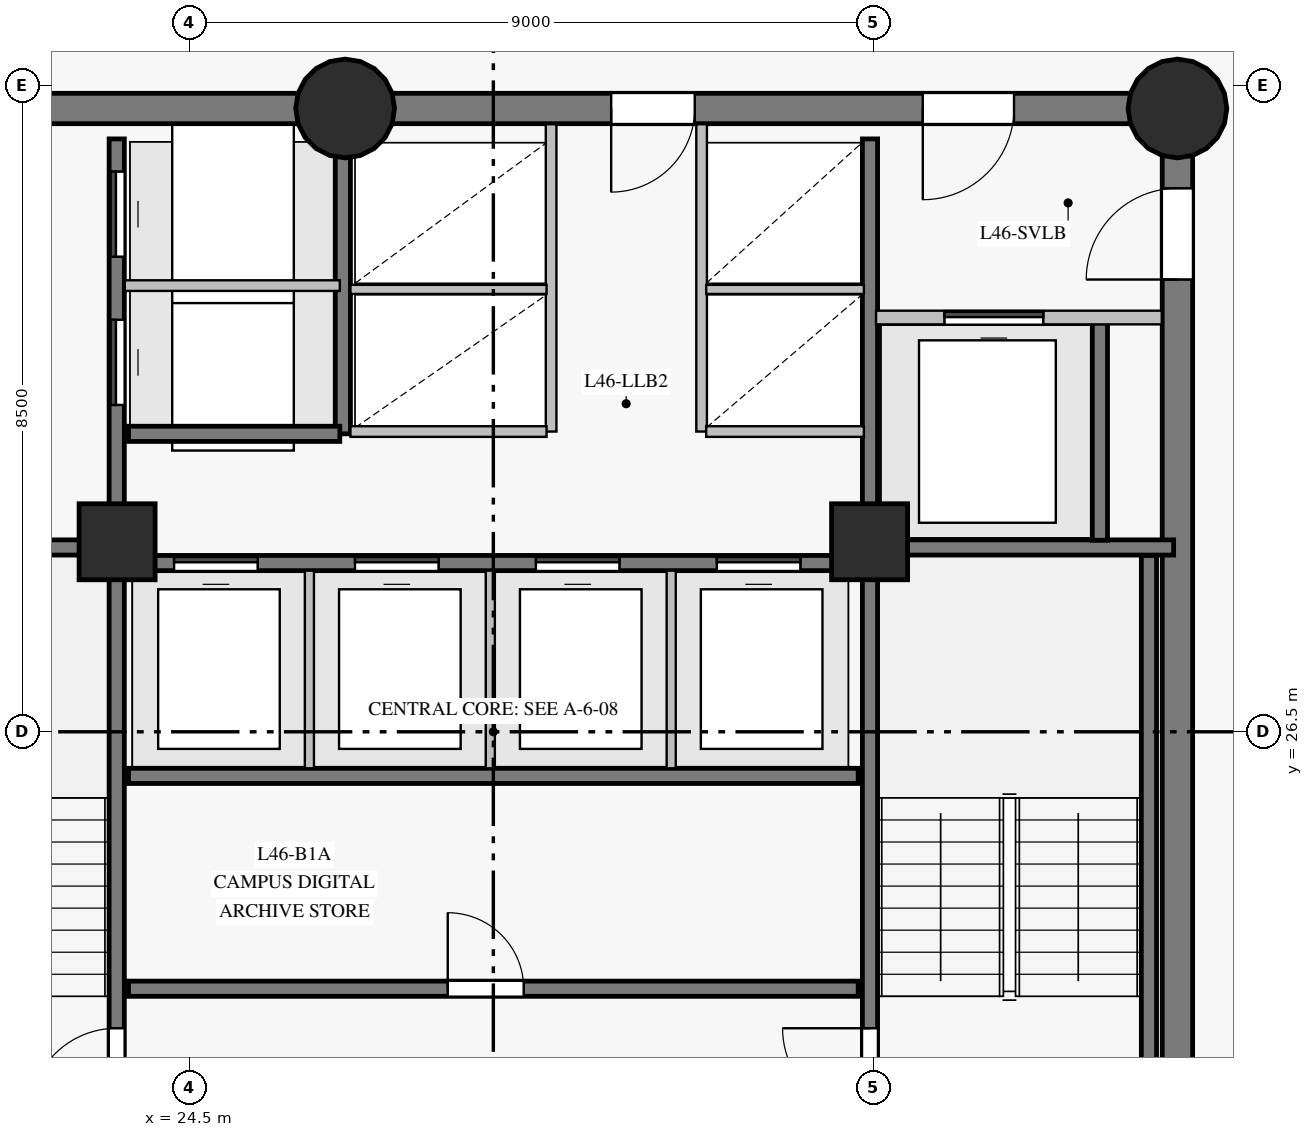
"""IFC4 building model, lengths in metres.
Left out: names, types, materials, properties, quantities, classifications, styles, units other than length and angle.
Written with IfcOpenShell. Run it as: python <this file> out.ifc"""

import sys

from ifc_helpers import new_model, si_unit, direction, frame, frame_2d, origin, origin_with_axes, origin_2d, place, context, subcontext, project, spatial, rectangle, circle, extrude, source, transform, mapped, element, fill, save


model = new_model("IFC4")
c1 = context("Model", 3, precision=1e-05, world=origin(), true_north=direction((0.0, 1.0)))
c2 = subcontext(c1, "Body", "Model", "MODEL_VIEW")
j1 = project(units=[si_unit("LENGTHUNIT", "METRE"), si_unit("PLANEANGLEUNIT", "RADIAN")], contexts=[c1])
p1 = place(None, origin())
s1 = spatial("IfcSite", under=j1, at=p1, CompositionType="ELEMENT")
p2 = place(p1, origin())
s2 = spatial("IfcBuilding", under=s1, at=p2, CompositionType="ELEMENT")
p3 = place(p2, frame((0.0, 0.0, 162.65)))
s3 = spatial("IfcBuildingStorey", under=s2, at=p3, CompositionType="ELEMENT", Elevation=162.65)
p4 = place(p3, frame((37.5, 18.3, 0.0), z_axis=(0.0, 0.0, 1.0), x_axis=(0.0, 1.0, 0.0)))
e1 = element("IfcWall", 1, at=p4, inside=s3, PredefinedType="SHEAR", context=c2, shape_type="SweptSolid", body=[
    extrude(rectangle(XDim=16.4, YDim=0.4, at=frame_2d((8.2, 0.0))), origin(), (0.0, 0.0, 1.0), 2.825),
])
p5 = place(p4, frame((14.15, 0.0, 0.0)))
e2 = element("IfcOpeningElement", 2, at=p5, cuts=e1, PredefinedType="OPENING", context=c2, shape_type="SweptSolid", body=[
    extrude(rectangle(XDim=1.2, YDim=2.15, at=frame_2d((0.6, 1.075))), frame((0.0, 0.21, 0.0), z_axis=(0.0, -1.0, 0.0), x_axis=(1.0, 0.0, 0.0)), (0.0, 0.0, 1.0), 0.42),
])
p6 = place(p3, frame((37.5, 34.7, 0.0), z_axis=(0.0, 0.0, 1.0), x_axis=(-1.0, 0.0, 0.0)))
e3 = element("IfcWall", 3, at=p6, inside=s3, PredefinedType="SHEAR", context=c2, shape_type="SweptSolid", body=[
    extrude(rectangle(XDim=10.95, YDim=0.4, at=frame_2d((5.475, 0.0))), origin(), (0.0, 0.0, 1.0), 2.825),
])
p7 = place(p6, frame((2.15, 0.0, 0.0)))
e4 = element("IfcOpeningElement", 4, at=p7, cuts=e3, PredefinedType="OPENING", context=c2, shape_type="SweptSolid", body=[
    extrude(rectangle(XDim=1.2, YDim=2.15, at=frame_2d((0.6, 1.075))), frame((0.0, 0.21, 0.0), z_axis=(0.0, -1.0, 0.0), x_axis=(1.0, 0.0, 0.0)), (0.0, 0.0, 1.0), 0.42),
])
p8 = place(p6, frame((6.35, 0.0, 0.0)))
e5 = element("IfcOpeningElement", 5, at=p8, cuts=e3, PredefinedType="OPENING", context=c2, shape_type="SweptSolid", body=[
    extrude(rectangle(XDim=1.1, YDim=2.15, at=frame_2d((0.55, 1.075))), frame((0.0, 0.21, 0.0), z_axis=(0.0, -1.0, 0.0), x_axis=(1.0, 0.0, 0.0)), (0.0, 0.0, 1.0), 0.42),
])
p9 = place(p3, frame((26.55, 34.7, 0.0), z_axis=(0.0, 0.0, 1.0), x_axis=(-1.0, 0.0, 0.0)))
e6 = element("IfcWall", 6, at=p9, inside=s3, PredefinedType="SHEAR", context=c2, shape_type="SweptSolid", body=[
    extrude(rectangle(XDim=7.05, YDim=0.4, at=frame_2d((3.525, 0.0))), origin(), (0.0, 0.0, 1.0), 2.825),
])
p10 = place(p9, frame((4.25, 0.0, 0.0)))
e7 = element("IfcOpeningElement", 7, at=p10, cuts=e6, PredefinedType="OPENING", context=c2, shape_type="SweptSolid", body=[
    extrude(rectangle(XDim=1.1, YDim=2.15, at=frame_2d((0.55, 1.075))), frame((0.0, 0.21, 0.0), z_axis=(0.0, -1.0, 0.0), x_axis=(1.0, 0.0, 0.0)), (0.0, 0.0, 1.0), 0.42),
])
m1 = source(origin_with_axes(), c2, "Body", "SweptSolid", [
    extrude(circle(Radius=0.65, at=origin_2d()), origin(), (0.0, 0.0, 1.0), 3.05),
])
for number, where, z_axis, x_axis in (
    (8, (26.55, 34.7, 0.0), (0.0, 0.0, 1.0), (1.0, 0.0, 0.0)),
    (9, (37.5, 34.7, 0.0), (0.0, 0.0, 1.0), (1.0, 0.0, 0.0)),
):
    element("IfcColumn", number, at=place(p3, frame(where, z_axis=z_axis, x_axis=x_axis)), inside=s3, PredefinedType="COLUMN", context=c2, shape_type="MappedRepresentation", body=[
        mapped(m1, transform((0.0, 0.0, 0.0), scale=1.0)),
    ])
m2 = source(origin_with_axes(), c2, "Body", "SweptSolid", [
    extrude(rectangle(XDim=1.0, YDim=1.0, at=origin_2d()), origin(), (0.0, 0.0, 1.0), 3.05),
])
for number, where, z_axis, x_axis in (
    (10, (23.55, 29.0, 0.0), (0.0, 0.0, 1.0), (1.0, 0.0, 0.0)),
    (11, (33.45, 29.0, 0.0), (0.0, 0.0, 1.0), (1.0, 0.0, 0.0)),
):
    element("IfcColumn", number, at=place(p3, frame(where, z_axis=z_axis, x_axis=x_axis)), inside=s3, PredefinedType="COLUMN", context=c2, shape_type="MappedRepresentation", body=[
        mapped(m2, transform((0.0, 0.0, 0.0), scale=1.0)),
    ])
p11 = place(p3, frame((23.545, 18.7, 0.0), z_axis=(0.0, 0.0, 1.0), x_axis=(0.0, 1.0, 0.0)))
e12 = element("IfcWall", 12, at=p11, inside=s3, PredefinedType="SHEAR", context=c2, shape_type="SweptSolid", body=[
    extrude(rectangle(XDim=15.6, YDim=0.2, at=frame_2d((7.8, 0.0))), origin(), (0.0, 0.0, 1.0), 2.825),
])
p12 = place(p11, frame((2.75, 0.0, 0.0)))
e13 = element("IfcOpeningElement", 13, at=p12, cuts=e12, PredefinedType="OPENING", context=c2, shape_type="SweptSolid", body=[
    extrude(rectangle(XDim=1.15, YDim=2.15, at=frame_2d((0.575, 1.075))), frame((0.0, 0.11, 0.0), z_axis=(0.0, -1.0, 0.0), x_axis=(1.0, 0.0, 0.0)), (0.0, 0.0, 1.0), 0.22),
])
p13 = place(p11, frame((0.14, 0.0, 0.0)))
e14 = element("IfcOpeningElement", 14, at=p13, cuts=e12, PredefinedType="OPENING", context=c2, shape_type="SweptSolid", body=[
    extrude(rectangle(XDim=0.88, YDim=2.1, at=frame_2d((0.44, 1.05))), frame((0.0, 0.11, 0.0), z_axis=(0.0, -1.0, 0.0), x_axis=(1.0, 0.0, 0.0)), (0.0, 0.0, 1.0), 0.22),
])
p14 = place(p11, frame((1.36, 0.0, 0.0)))
e15 = element("IfcOpeningElement", 15, at=p14, cuts=e12, PredefinedType="OPENING", context=c2, shape_type="SweptSolid", body=[
    extrude(rectangle(XDim=0.88, YDim=2.1, at=frame_2d((0.44, 1.05))), frame((0.0, 0.11, 0.0), z_axis=(0.0, -1.0, 0.0), x_axis=(1.0, 0.0, 0.0)), (0.0, 0.0, 1.0), 0.22),
])
p15 = place(p11, frame((12.1, 0.0, 0.0)))
e16 = element("IfcOpeningElement", 16, at=p15, cuts=e12, PredefinedType="OPENING", context=c2, shape_type="SweptSolid", body=[
    extrude(rectangle(XDim=1.12, YDim=2.15, at=frame_2d((0.56, 1.075))), frame((0.0, 0.11, 0.0), z_axis=(0.0, -1.0, 0.0), x_axis=(1.0, 0.0, 0.0)), (0.0, 0.0, 1.0), 0.22),
])
p16 = place(p11, frame((14.05, 0.0, 0.0)))
e17 = element("IfcOpeningElement", 17, at=p16, cuts=e12, PredefinedType="OPENING", context=c2, shape_type="SweptSolid", body=[
    extrude(rectangle(XDim=1.12, YDim=2.15, at=frame_2d((0.56, 1.075))), frame((0.0, 0.11, 0.0), z_axis=(0.0, -1.0, 0.0), x_axis=(1.0, 0.0, 0.0)), (0.0, 0.0, 1.0), 0.22),
])
p17 = place(p3, frame((33.455, 18.7, 0.0), z_axis=(0.0, 0.0, 1.0), x_axis=(0.0, 1.0, 0.0)))
e18 = element("IfcWall", 18, at=p17, inside=s3, PredefinedType="SHEAR", context=c2, shape_type="SweptSolid", body=[
    extrude(rectangle(XDim=15.6, YDim=0.2, at=frame_2d((7.8, 0.0))), origin(), (0.0, 0.0, 1.0), 2.825),
])
p18 = place(p17, frame((2.75, 0.0, 0.0)))
e19 = element("IfcOpeningElement", 19, at=p18, cuts=e18, PredefinedType="OPENING", context=c2, shape_type="SweptSolid", body=[
    extrude(rectangle(XDim=1.15, YDim=2.15, at=frame_2d((0.575, 1.075))), frame((0.0, 0.11, 0.0), z_axis=(0.0, -1.0, 0.0), x_axis=(1.0, 0.0, 0.0)), (0.0, 0.0, 1.0), 0.22),
])
p19 = place(p17, frame((0.55, 0.0, 0.0)))
e20 = element("IfcOpeningElement", 20, at=p19, cuts=e18, PredefinedType="OPENING", context=c2, shape_type="SweptSolid", body=[
    extrude(rectangle(XDim=0.94, YDim=2.1, at=frame_2d((0.47, 1.05))), frame((0.0, 0.11, 0.0), z_axis=(0.0, -1.0, 0.0), x_axis=(1.0, 0.0, 0.0)), (0.0, 0.0, 1.0), 0.22),
])
p20 = place(p3, frame((23.7, 23.12, 0.0), z_axis=(0.0, 0.0, 1.0), x_axis=(1.0, 0.0, 0.0)))
e21 = element("IfcWall", 21, at=p20, inside=s3, PredefinedType="SHEAR", context=c2, shape_type="SweptSolid", body=[
    extrude(rectangle(XDim=9.6, YDim=0.2, at=frame_2d((4.8, 0.0))), origin(), (0.0, 0.0, 1.0), 2.825),
])
p21 = place(p20, frame((4.2, 0.0, 0.0)))
e22 = element("IfcOpeningElement", 22, at=p21, cuts=e21, PredefinedType="OPENING", context=c2, shape_type="SweptSolid", body=[
    extrude(rectangle(XDim=1.0, YDim=2.15, at=frame_2d((0.5, 1.075))), frame((0.0, 0.11, 0.0), z_axis=(0.0, -1.0, 0.0), x_axis=(1.0, 0.0, 0.0)), (0.0, 0.0, 1.0), 0.22),
])
p22 = place(p3, frame((23.7, 25.92, 0.0), z_axis=(0.0, 0.0, 1.0), x_axis=(1.0, 0.0, 0.0)))
e23 = element("IfcWall", 23, at=p22, inside=s3, PredefinedType="SHEAR", context=c2, shape_type="SweptSolid", body=[
    extrude(rectangle(XDim=9.6, YDim=0.2, at=frame_2d((4.8, 0.0))), origin(), (0.0, 0.0, 1.0), 2.825),
])
p23 = place(p3, frame((23.7, 28.72, 0.0), z_axis=(0.0, 0.0, 1.0), x_axis=(1.0, 0.0, 0.0)))
e24 = element("IfcWall", 24, at=p23, inside=s3, PredefinedType="SHEAR", context=c2, shape_type="SweptSolid", body=[
    extrude(rectangle(XDim=9.6, YDim=0.2, at=frame_2d((4.8, 0.0))), origin(), (0.0, 0.0, 1.0), 2.825),
])
p24 = place(p23, frame((0.6, 0.0, 0.0)))
e25 = element("IfcOpeningElement", 25, at=p24, cuts=e24, PredefinedType="OPENING", context=c2, shape_type="SweptSolid", body=[
    extrude(rectangle(XDim=1.1, YDim=2.15, at=frame_2d((0.55, 1.075))), frame((0.0, 0.11, 0.0), z_axis=(0.0, -1.0, 0.0), x_axis=(1.0, 0.0, 0.0)), (0.0, 0.0, 1.0), 0.22),
])
p25 = place(p23, frame((2.98, 0.0, 0.0)))
e26 = element("IfcOpeningElement", 26, at=p25, cuts=e24, PredefinedType="OPENING", context=c2, shape_type="SweptSolid", body=[
    extrude(rectangle(XDim=1.1, YDim=2.15, at=frame_2d((0.55, 1.075))), frame((0.0, 0.11, 0.0), z_axis=(0.0, -1.0, 0.0), x_axis=(1.0, 0.0, 0.0)), (0.0, 0.0, 1.0), 0.22),
])
p26 = place(p23, frame((5.36, 0.0, 0.0)))
e27 = element("IfcOpeningElement", 27, at=p26, cuts=e24, PredefinedType="OPENING", context=c2, shape_type="SweptSolid", body=[
    extrude(rectangle(XDim=1.1, YDim=2.15, at=frame_2d((0.55, 1.075))), frame((0.0, 0.11, 0.0), z_axis=(0.0, -1.0, 0.0), x_axis=(1.0, 0.0, 0.0)), (0.0, 0.0, 1.0), 0.22),
])
p27 = place(p23, frame((7.74, 0.0, 0.0)))
e28 = element("IfcOpeningElement", 28, at=p27, cuts=e24, PredefinedType="OPENING", context=c2, shape_type="SweptSolid", body=[
    extrude(rectangle(XDim=1.1, YDim=2.15, at=frame_2d((0.55, 1.075))), frame((0.0, 0.11, 0.0), z_axis=(0.0, -1.0, 0.0), x_axis=(1.0, 0.0, 0.0)), (0.0, 0.0, 1.0), 0.22),
])
p28 = place(p3, frame((37.125, 21.32, 0.0), z_axis=(0.0, 0.0, 1.0), x_axis=(0.0, 1.0, 0.0)))
e29 = element("IfcWall", 29, at=p28, inside=s3, PredefinedType="SHEAR", context=c2, shape_type="SweptSolid", body=[
    extrude(rectangle(XDim=7.5, YDim=0.2, at=frame_2d((3.75, 0.0))), origin(), (0.0, 0.0, 1.0), 2.825),
])
for number, where, z_axis, x_axis in (
    (30, (33.455, 28.925, 0.0), (0.0, 0.0, 1.0), (1.0, 0.0, 0.0)),
    (31, (19.55, 28.925, 0.0), (0.0, 0.0, 1.0), (1.0, 0.0, 0.0)),
):
    element("IfcWall", number, at=place(p3, frame(where, z_axis=z_axis, x_axis=x_axis)), inside=s3, PredefinedType="SHEAR", context=c2, shape_type="SweptSolid", body=[
        extrude(rectangle(XDim=3.995, YDim=0.2, at=frame_2d((1.998, 0.0))), origin(), (0.0, 0.0, 1.0), 2.825),
    ])
p29 = place(p3, frame((26.52, 30.42, 0.0), z_axis=(0.0, 0.0, 1.0), x_axis=(0.0, 1.0, 0.0)))
e32 = element("IfcWall", 32, at=p29, inside=s3, PredefinedType="SHEAR", context=c2, shape_type="SweptSolid", body=[
    extrude(rectangle(XDim=3.86, YDim=0.2, at=frame_2d((1.93, 0.0))), origin(), (0.0, 0.0, 1.0), 2.825),
])
p30 = place(p3, frame((36.48, 29.02, 0.0), z_axis=(0.0, 0.0, 1.0), x_axis=(0.0, 1.0, 0.0)))
e33 = element("IfcWall", 33, at=p30, inside=s3, PredefinedType="SHEAR", context=c2, shape_type="SweptSolid", body=[
    extrude(rectangle(XDim=2.86, YDim=0.2, at=frame_2d((1.43, 0.0))), origin(), (0.0, 0.0, 1.0), 2.825),
])
p31 = place(p3, frame((23.7, 30.42, 0.0), z_axis=(0.0, 0.0, 1.0), x_axis=(1.0, 0.0, 0.0)))
e34 = element("IfcWall", 34, at=p31, inside=s3, PredefinedType="SHEAR", context=c2, shape_type="SweptSolid", body=[
    extrude(rectangle(XDim=2.78, YDim=0.2, at=frame_2d((1.39, 0.0))), origin(), (0.0, 0.0, 1.0), 2.825),
])
for number, where, z_axis, x_axis in (
    (35, (29.26, 30.45, 0.0), (0.0, 0.0, 1.0), (0.0, 1.0, 0.0)),
    (36, (31.24, 30.45, 0.0), (0.0, 0.0, 1.0), (0.0, 1.0, 0.0)),
):
    element("IfcWall", number, at=place(p3, frame(where, z_axis=z_axis, x_axis=x_axis)), inside=s3, PredefinedType="PARTITIONING", context=c2, shape_type="SweptSolid", body=[
        extrude(rectangle(XDim=4.043, YDim=0.14, at=frame_2d((2.021, 0.0))), origin(), (0.0, 0.0, 1.0), 2.825),
    ])
p32 = place(p3, frame((33.535, 31.95, 0.0), z_axis=(0.0, 0.0, 1.0), x_axis=(1.0, 0.0, 0.0)))
e37 = element("IfcWall", 37, at=p32, inside=s3, PredefinedType="PARTITIONING", context=c2, shape_type="SweptSolid", body=[
    extrude(rectangle(XDim=3.759, YDim=0.18, at=frame_2d((1.879, 0.0))), origin(), (0.0, 0.0, 1.0), 2.825),
])
p33 = place(p32, frame((0.9, 0.0, 0.0)))
e38 = element("IfcOpeningElement", 38, at=p33, cuts=e37, PredefinedType="OPENING", context=c2, shape_type="SweptSolid", body=[
    extrude(rectangle(XDim=1.3, YDim=2.2, at=frame_2d((0.65, 1.1))), frame((0.0, 0.1, 0.0), z_axis=(0.0, -1.0, 0.0), x_axis=(1.0, 0.0, 0.0)), (0.0, 0.0, 1.0), 0.2),
])
p34 = place(p3, frame((23.652, 32.37, 0.0), z_axis=(0.0, 0.0, 1.0), x_axis=(1.0, 0.0, 0.0)))
e39 = element("IfcWall", 39, at=p34, inside=s3, PredefinedType="PARTITIONING", context=c2, shape_type="SweptSolid", body=[
    extrude(rectangle(XDim=2.828, YDim=0.14, at=frame_2d((1.414, 0.0))), origin(), (0.0, 0.0, 1.0), 2.825),
])
for number, where, z_axis, x_axis in (
    (40, (26.08, 26.02, 0.0), (0.0, 0.0, 1.0), (0.0, 1.0, 0.0)),
    (41, (28.46, 26.02, 0.0), (0.0, 0.0, 1.0), (0.0, 1.0, 0.0)),
    (42, (30.84, 26.02, 0.0), (0.0, 0.0, 1.0), (0.0, 1.0, 0.0)),
):
    element("IfcWall", number, at=place(p3, frame(where, z_axis=z_axis, x_axis=x_axis)), inside=s3, PredefinedType="PARTITIONING", context=c2, shape_type="SweptSolid", body=[
        extrude(rectangle(XDim=2.6, YDim=0.12, at=frame_2d((1.3, 0.0))), origin(), (0.0, 0.0, 1.0), 2.825),
    ])
p35 = place(p3, frame((26.62, 30.45, 0.0), z_axis=(0.0, 0.0, 1.0), x_axis=(1.0, 0.0, 0.0)))
e43 = element("IfcWall", 43, at=p35, inside=s3, PredefinedType="PARTITIONING", context=c2, shape_type="SweptSolid", body=[
    extrude(rectangle(XDim=2.58, YDim=0.14, at=frame_2d((1.29, 0.0))), origin(), (0.0, 0.0, 1.0), 2.825),
])
p36 = place(p3, frame((26.62, 32.32, 0.0), z_axis=(0.0, 0.0, 1.0), x_axis=(1.0, 0.0, 0.0)))
e44 = element("IfcWall", 44, at=p36, inside=s3, PredefinedType="PARTITIONING", context=c2, shape_type="SweptSolid", body=[
    extrude(rectangle(XDim=2.58, YDim=0.12, at=frame_2d((1.29, 0.0))), origin(), (0.0, 0.0, 1.0), 2.825),
])
p37 = place(p3, frame((31.3, 30.45, 0.0), z_axis=(0.0, 0.0, 1.0), x_axis=(1.0, 0.0, 0.0)))
e45 = element("IfcWall", 45, at=p37, inside=s3, PredefinedType="PARTITIONING", context=c2, shape_type="SweptSolid", body=[
    extrude(rectangle(XDim=2.075, YDim=0.14, at=frame_2d((1.038, 0.0))), origin(), (0.0, 0.0, 1.0), 2.825),
])
p38 = place(p3, frame((31.3, 32.32, 0.0), z_axis=(0.0, 0.0, 1.0), x_axis=(1.0, 0.0, 0.0)))
e46 = element("IfcWall", 46, at=p38, inside=s3, PredefinedType="PARTITIONING", context=c2, shape_type="SweptSolid", body=[
    extrude(rectangle(XDim=2.075, YDim=0.12, at=frame_2d((1.038, 0.0))), origin(), (0.0, 0.0, 1.0), 2.825),
])
m3 = source(origin_with_axes(), c2, "Body", "SweptSolid", [
    extrude(rectangle(XDim=1.15, YDim=2.15, at=frame_2d((0.575, 1.075))), frame((0.0, 0.025, 0.0), z_axis=(0.0, -1.0, 0.0), x_axis=(1.0, 0.0, 0.0)), (0.0, 0.0, 1.0), 0.05),
])
p39 = place(p12, origin())
e47 = element("IfcDoor", 47, at=p39, inside=s3, OperationType="SINGLE_SWING_LEFT", PredefinedType="DOOR", context=c2, shape_type="MappedRepresentation", body=[
    mapped(m3, transform((0.0, 0.0, 0.0), scale=1.0)),
])
fill(e13, e47)
p40 = place(p18, origin())
e48 = element("IfcDoor", 48, at=p40, inside=s3, OperationType="SINGLE_SWING_RIGHT", PredefinedType="DOOR", context=c2, shape_type="MappedRepresentation", body=[
    mapped(m3, transform((0.0, 0.0, 0.0), scale=1.0)),
])
fill(e19, e48)
m4 = source(origin_with_axes(), c2, "Body", "SweptSolid", [
    extrude(rectangle(XDim=1.2, YDim=2.15, at=frame_2d((0.6, 1.075))), frame((0.0, 0.025, 0.0), z_axis=(0.0, -1.0, 0.0), x_axis=(1.0, 0.0, 0.0)), (0.0, 0.0, 1.0), 0.05),
])
p41 = place(p5, origin())
e49 = element("IfcDoor", 49, at=p41, inside=s3, OperationType="SINGLE_SWING_LEFT", PredefinedType="DOOR", context=c2, shape_type="MappedRepresentation", body=[
    mapped(m4, transform((0.0, 0.0, 0.0), scale=1.0)),
])
fill(e2, e49)
p42 = place(p7, origin())
e50 = element("IfcDoor", 50, at=p42, inside=s3, OperationType="SINGLE_SWING_RIGHT", PredefinedType="DOOR", context=c2, shape_type="MappedRepresentation", body=[
    mapped(m4, transform((0.0, 0.0, 0.0), scale=1.0)),
])
fill(e4, e50)
m5 = source(origin_with_axes(), c2, "Body", "SweptSolid", [
    extrude(rectangle(XDim=1.3, YDim=2.2, at=frame_2d((0.65, 1.1))), frame((0.0, 0.025, 0.0), z_axis=(0.0, -1.0, 0.0), x_axis=(1.0, 0.0, 0.0)), (0.0, 0.0, 1.0), 0.05),
])
p43 = place(p33, origin())
e51 = element("IfcDoor", 51, at=p43, inside=s3, OperationType="SLIDING_TO_LEFT", PredefinedType="DOOR", context=c2, shape_type="MappedRepresentation", body=[
    mapped(m5, transform((0.0, 0.0, 0.0), scale=1.0)),
])
fill(e38, e51)
m6 = source(origin_with_axes(), c2, "Body", "SweptSolid", [
    extrude(rectangle(XDim=1.0, YDim=2.15, at=frame_2d((0.5, 1.075))), frame((0.0, 0.025, 0.0), z_axis=(0.0, -1.0, 0.0), x_axis=(1.0, 0.0, 0.0)), (0.0, 0.0, 1.0), 0.05),
])
p44 = place(p21, origin())
e52 = element("IfcDoor", 52, at=p44, inside=s3, OperationType="SINGLE_SWING_LEFT", PredefinedType="DOOR", context=c2, shape_type="MappedRepresentation", body=[
    mapped(m6, transform((0.0, 0.0, 0.0), scale=1.0)),
])
fill(e22, e52)
m7 = source(origin_with_axes(), c2, "Body", "SweptSolid", [
    extrude(rectangle(XDim=1.1, YDim=2.15, at=frame_2d((0.55, 1.075))), frame((0.0, 0.025, 0.0), z_axis=(0.0, -1.0, 0.0), x_axis=(1.0, 0.0, 0.0)), (0.0, 0.0, 1.0), 0.05),
])
p45 = place(p24, origin())
e53 = element("IfcDoor", 53, at=p45, inside=s3, OperationType="SLIDING_TO_LEFT", PredefinedType="DOOR", context=c2, shape_type="MappedRepresentation", body=[
    mapped(m7, transform((0.0, 0.0, 0.0), scale=1.0)),
])
fill(e25, e53)
p46 = place(p25, origin())
e54 = element("IfcDoor", 54, at=p46, inside=s3, OperationType="SLIDING_TO_RIGHT", PredefinedType="DOOR", context=c2, shape_type="MappedRepresentation", body=[
    mapped(m7, transform((0.0, 0.0, 0.0), scale=1.0)),
])
fill(e26, e54)
p47 = place(p26, origin())
e55 = element("IfcDoor", 55, at=p47, inside=s3, OperationType="SLIDING_TO_LEFT", PredefinedType="DOOR", context=c2, shape_type="MappedRepresentation", body=[
    mapped(m7, transform((0.0, 0.0, 0.0), scale=1.0)),
])
fill(e27, e55)
p48 = place(p27, origin())
e56 = element("IfcDoor", 56, at=p48, inside=s3, OperationType="SLIDING_TO_RIGHT", PredefinedType="DOOR", context=c2, shape_type="MappedRepresentation", body=[
    mapped(m7, transform((0.0, 0.0, 0.0), scale=1.0)),
])
fill(e28, e56)
p49 = place(p8, origin())
e57 = element("IfcDoor", 57, at=p49, inside=s3, OperationType="SINGLE_SWING_RIGHT", PredefinedType="DOOR", context=c2, shape_type="MappedRepresentation", body=[
    mapped(m7, transform((0.0, 0.0, 0.0), scale=1.0)),
])
fill(e5, e57)
m8 = source(origin_with_axes(), c2, "Body", "SweptSolid", [
    extrude(rectangle(XDim=1.12, YDim=2.15, at=frame_2d((0.56, 1.075))), frame((0.0, 0.025, 0.0), z_axis=(0.0, -1.0, 0.0), x_axis=(1.0, 0.0, 0.0)), (0.0, 0.0, 1.0), 0.05),
])
p50 = place(p15, origin())
e58 = element("IfcDoor", 58, at=p50, inside=s3, OperationType="SLIDING_TO_LEFT", PredefinedType="DOOR", context=c2, shape_type="MappedRepresentation", body=[
    mapped(m8, transform((0.0, 0.0, 0.0), scale=1.0)),
])
fill(e16, e58)
p51 = place(p16, origin())
e59 = element("IfcDoor", 59, at=p51, inside=s3, OperationType="SLIDING_TO_RIGHT", PredefinedType="DOOR", context=c2, shape_type="MappedRepresentation", body=[
    mapped(m8, transform((0.0, 0.0, 0.0), scale=1.0)),
])
fill(e17, e59)
save(model, sys.argv[1])
